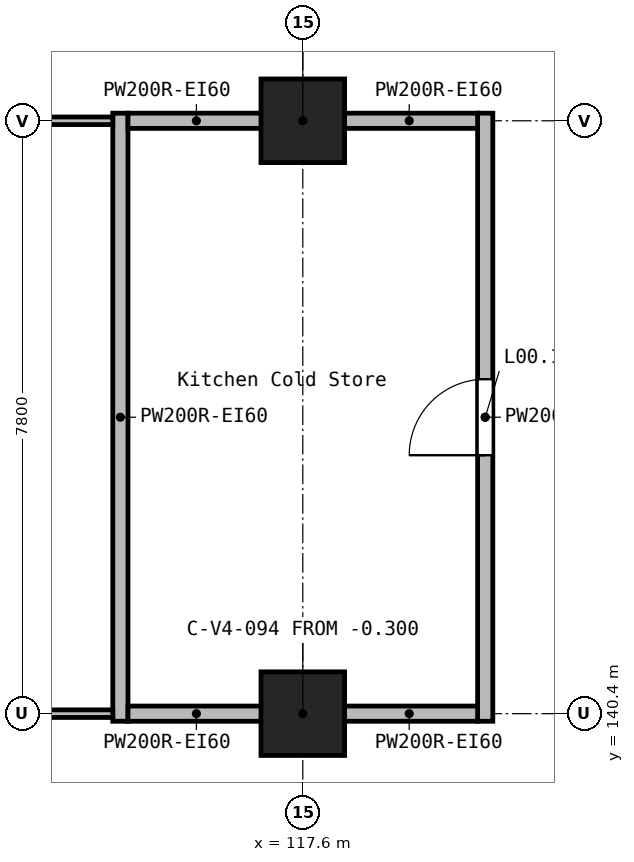
"""IFC4 building model, lengths in metres.
Left out: names, types, materials, properties, quantities, classifications, styles, units other than length and angle.
Written with IfcOpenShell. Run it as: python <this file> out.ifc"""

import sys

from ifc_helpers import new_model, si_unit, direction, frame, frame_2d, origin, origin_2d, place, context, subcontext, project, spatial, rectangle, extrude, element, fill, save


model = new_model("IFC4")
c1 = context("Model", 3, precision=1e-05, world=origin(), true_north=direction((0.0, 1.0)))
c2 = subcontext(c1, "Body", "Model", "MODEL_VIEW")
j1 = project(units=[si_unit("LENGTHUNIT", "METRE"), si_unit("PLANEANGLEUNIT", "RADIAN")], contexts=[c1])
p1 = place(None, origin())
s1 = spatial("IfcSite", under=j1, at=p1, CompositionType="ELEMENT")
p2 = place(p1, origin())
s2 = spatial("IfcBuilding", under=s1, at=p2, CompositionType="ELEMENT")
p3 = place(p2, origin())
s3 = spatial("IfcBuildingStorey", under=s2, at=p3, CompositionType="ELEMENT", Elevation=0.0)
for number, where, z_axis, x_axis in (
    (1, (117.6, 140.4, -0.3), (0.0, 0.0, 1.0), (1.0, 0.0, 0.0)),
    (2, (117.6, 148.2, -0.3), (0.0, 0.0, 1.0), (1.0, 0.0, 0.0)),
):
    element("IfcColumn", number, at=place(p3, frame(where, z_axis=z_axis, x_axis=x_axis)), inside=s3, PredefinedType="COLUMN", context=c2, shape_type="SweptSolid", body=[
        extrude(rectangle(XDim=1.1, YDim=1.1, at=origin_2d()), origin(), (0.0, 0.0, 1.0), 5.7),
    ])
p4 = place(p3, frame((115.2, 140.3, 0.0), z_axis=(0.0, 0.0, 1.0), x_axis=(0.0, 1.0, 0.0)))
e3 = element("IfcWall", 3, at=p4, inside=s3, PredefinedType="SOLIDWALL", context=c2, shape_type="SweptSolid", body=[
    extrude(rectangle(XDim=8.0, YDim=0.2, at=frame_2d((4.0, 0.0))), origin(), (0.0, 0.0, 1.0), 5.05),
])
p5 = place(p3, frame((120.0, 140.3, 0.0), z_axis=(0.0, 0.0, 1.0), x_axis=(0.0, 1.0, 0.0)))
e4 = element("IfcWall", 4, at=p5, inside=s3, PredefinedType="SOLIDWALL", context=c2, shape_type="SweptSolid", body=[
    extrude(rectangle(XDim=8.0, YDim=0.2, at=frame_2d((4.0, 0.0))), origin(), (0.0, 0.0, 1.0), 5.05),
])
p6 = place(p5, frame((3.5, 0.0, 0.0)))
e5 = element("IfcOpeningElement", 5, at=p6, cuts=e4, PredefinedType="OPENING", context=c2, shape_type="SweptSolid", body=[
    extrude(rectangle(XDim=1.0, YDim=2.1, at=frame_2d((0.5, 1.05))), frame((0.0, 0.11, 0.0), z_axis=(0.0, -1.0, 0.0), x_axis=(1.0, 0.0, 0.0)), (0.0, 0.0, 1.0), 0.22),
])
p7 = place(p3, frame((115.3, 140.4, 0.0), z_axis=(0.0, 0.0, 1.0), x_axis=(1.0, 0.0, 0.0)))
e6 = element("IfcWall", 6, at=p7, inside=s3, PredefinedType="SOLIDWALL", context=c2, shape_type="SweptSolid", body=[
    extrude(rectangle(XDim=1.8, YDim=0.2, at=frame_2d((0.9, 0.0))), origin(), (0.0, 0.0, 1.0), 5.05),
])
p8 = place(p3, frame((118.1, 140.4, 0.0), z_axis=(0.0, 0.0, 1.0), x_axis=(1.0, 0.0, 0.0)))
e7 = element("IfcWall", 7, at=p8, inside=s3, PredefinedType="SOLIDWALL", context=c2, shape_type="SweptSolid", body=[
    extrude(rectangle(XDim=1.8, YDim=0.2, at=frame_2d((0.9, 0.0))), origin(), (0.0, 0.0, 1.0), 5.05),
])
p9 = place(p3, frame((115.3, 148.2, 0.0), z_axis=(0.0, 0.0, 1.0), x_axis=(1.0, 0.0, 0.0)))
e8 = element("IfcWall", 8, at=p9, inside=s3, PredefinedType="SOLIDWALL", context=c2, shape_type="SweptSolid", body=[
    extrude(rectangle(XDim=1.8, YDim=0.2, at=frame_2d((0.9, 0.0))), origin(), (0.0, 0.0, 1.0), 5.05),
])
p10 = place(p3, frame((118.1, 148.2, 0.0), z_axis=(0.0, 0.0, 1.0), x_axis=(1.0, 0.0, 0.0)))
e9 = element("IfcWall", 9, at=p10, inside=s3, PredefinedType="SOLIDWALL", context=c2, shape_type="SweptSolid", body=[
    extrude(rectangle(XDim=1.8, YDim=0.2, at=frame_2d((0.9, 0.0))), origin(), (0.0, 0.0, 1.0), 5.05),
])
p11 = place(p3, frame((109.7, 140.4, 0.0), z_axis=(0.0, 0.0, 1.0), x_axis=(1.0, 0.0, 0.0)))
e10 = element("IfcWall", 10, at=p11, inside=s3, PredefinedType="PARTITIONING", context=c2, shape_type="SweptSolid", body=[
    extrude(rectangle(XDim=5.4, YDim=0.1, at=frame_2d((2.7, 0.0))), origin(), (0.0, 0.0, 1.0), 5.05),
])
p12 = place(p11, frame((1.6, 0.0, 0.0)))
e11 = element("IfcOpeningElement", 11, at=p12, cuts=e10, PredefinedType="OPENING", context=c2, shape_type="SweptSolid", body=[
    extrude(rectangle(XDim=1.8, YDim=2.1, at=frame_2d((0.9, 1.05))), frame((0.0, 0.06, 0.0), z_axis=(0.0, -1.0, 0.0), x_axis=(1.0, 0.0, 0.0)), (0.0, 0.0, 1.0), 0.12),
])
p13 = place(p3, frame((109.7, 148.2, 0.0), z_axis=(0.0, 0.0, 1.0), x_axis=(1.0, 0.0, 0.0)))
e12 = element("IfcWall", 12, at=p13, inside=s3, PredefinedType="PARTITIONING", context=c2, shape_type="SweptSolid", body=[
    extrude(rectangle(XDim=5.4, YDim=0.1, at=frame_2d((2.7, 0.0))), origin(), (0.0, 0.0, 1.0), 5.05),
])
p14 = place(p6, origin())
e13 = element("IfcDoor", 13, at=p14, inside=s3, OperationType="SINGLE_SWING_LEFT", PredefinedType="DOOR", context=c2, shape_type="SweptSolid", body=[
    extrude(rectangle(XDim=1.0, YDim=2.1, at=frame_2d((0.5, 1.05))), frame((0.0, 0.025, 0.0), z_axis=(0.0, -1.0, 0.0), x_axis=(1.0, 0.0, 0.0)), (0.0, 0.0, 1.0), 0.05),
])
fill(e5, e13)
save(model, sys.argv[1])
